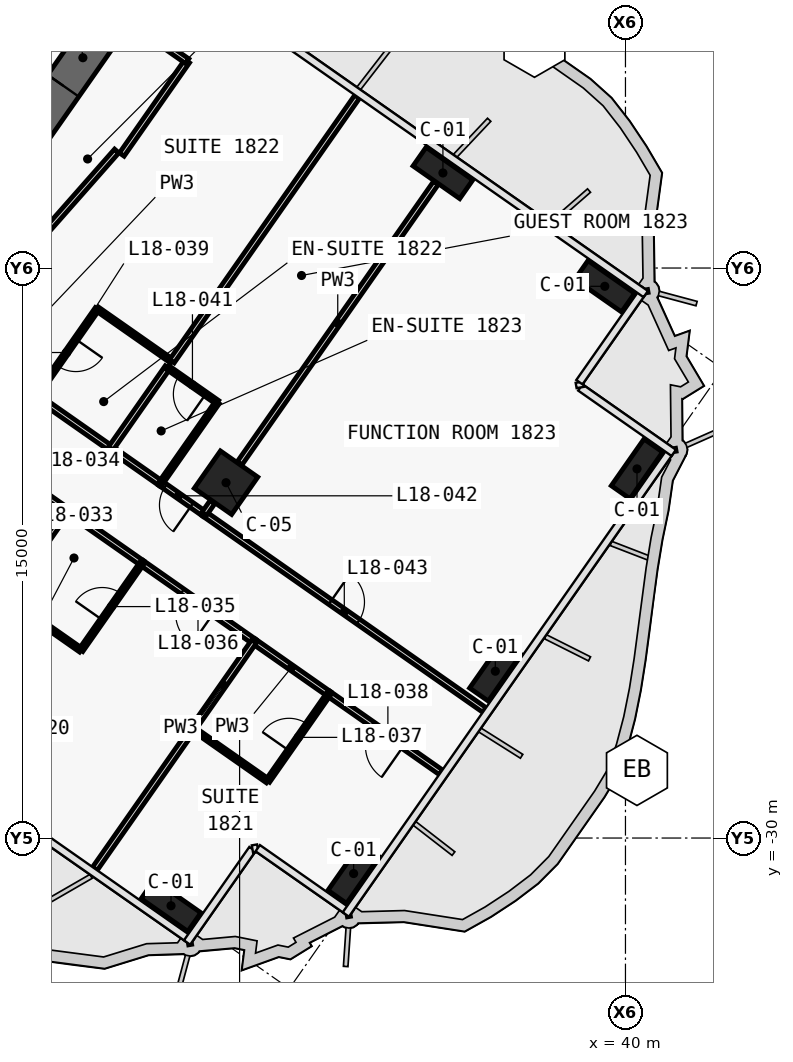
"""IFC4 building model, lengths in metres.
Left out: names, types, materials, properties, quantities, classifications, styles, units other than length and angle.
Written with IfcOpenShell. Run it as: python <this file> out.ifc"""

import sys

from ifc_helpers import new_model, si_unit, direction, frame, frame_2d, origin, origin_2d, place, context, subcontext, project, spatial, polyline, rectangle, outline, extrude, element, fill, save


model = new_model("IFC4")
c1 = context("Model", 3, precision=1e-05, world=origin(), true_north=direction((0.0, 1.0)))
c2 = subcontext(c1, "Body", "Model", "MODEL_VIEW")
j1 = project(units=[si_unit("LENGTHUNIT", "METRE"), si_unit("PLANEANGLEUNIT", "RADIAN")], contexts=[c1])
p1 = place(None, origin())
s1 = spatial("IfcSite", under=j1, at=p1, CompositionType="ELEMENT")
p2 = place(p1, origin())
s2 = spatial("IfcBuilding", under=s1, at=p2, CompositionType="ELEMENT")
p3 = place(p2, frame((0.0, 0.0, 90.5)))
s3 = spatial("IfcBuildingStorey", under=s2, at=p3, CompositionType="ELEMENT", Elevation=90.5)
p4 = place(p3, frame((21.708, -15.2, 0.0), z_axis=(0.0, 0.0, 1.0), x_axis=(0.573576324356, 0.819152122709, 0.0)))
e1 = element("IfcWall", 1, at=p4, inside=s3, PredefinedType="SHEAR", context=c2, shape_type="SweptSolid", body=[
    extrude(outline(polyline([(9.2, 0.5), (0.0, 0.5), (0.0, -0.5), (9.2, -0.5), (9.2, 0.5)])), origin(), (0.0, 0.0, 1.0), 3.6),
])
p5 = place(p4, frame((6.1, 0.0, 0.0)))
e2 = element("IfcOpeningElement", 2, at=p5, cuts=e1, PredefinedType="OPENING", context=c2, shape_type="SweptSolid", body=[
    extrude(rectangle(XDim=1.8, YDim=2.1, at=frame_2d((0.9, 1.05))), frame((0.0, 0.51, 0.0), z_axis=(0.0, -1.0, 0.0), x_axis=(1.0, 0.0, 0.0)), (0.0, 0.0, 1.0), 1.02),
])
p6 = place(p4, frame((1.9, 0.0, 0.0)))
e3 = element("IfcOpeningElement", 3, at=p6, cuts=e1, PredefinedType="OPENING", context=c2, shape_type="SweptSolid", body=[
    extrude(rectangle(XDim=1.8, YDim=2.1, at=frame_2d((0.9, 1.05))), frame((0.0, 0.51, 0.0), z_axis=(0.0, -1.0, 0.0), x_axis=(1.0, 0.0, 0.0)), (0.0, 0.0, 1.0), 1.02),
])
for number, where, z_axis, x_axis in (
    (4, (28.042, -31.782, 0.0), (0.0, 0.0, 1.0), (0.819, -0.574, 0.0)),
    (5, (35.197, -12.498, 0.0), (0.0, 0.0, 1.0), (0.819, -0.574, 0.0)),
    (6, (39.456, -15.481, 0.0), (0.0, 0.0, 1.0), (0.819, -0.574, 0.0)),
    (7, (32.847, -30.935, 0.0), (0.0, 0.0, 1.0), (0.574, 0.819, 0.0)),
    (8, (36.575, -25.61, 0.0), (0.0, 0.0, 1.0), (0.574, 0.819, 0.0)),
    (9, (40.303, -20.286, 0.0), (0.0, 0.0, 1.0), (0.574, 0.819, 0.0)),
):
    element("IfcColumn", number, at=place(p3, frame(where, z_axis=z_axis, x_axis=x_axis)), inside=s3, PredefinedType="COLUMN", context=c2, shape_type="SweptSolid", body=[
        extrude(rectangle(XDim=1.5, YDim=0.6, at=origin_2d()), origin(), (0.0, 0.0, 1.0), 3.6),
    ])
p7 = place(p3, frame((29.49, -20.649, 0.0), z_axis=(0.0, 0.0, 1.0), x_axis=(0.819152044289, -0.573576436351, 0.0)))
e10 = element("IfcColumn", 10, at=p7, inside=s3, PredefinedType="COLUMN", context=c2, shape_type="SweptSolid", body=[
    extrude(rectangle(XDim=1.2, YDim=1.2, at=origin_2d()), origin(), (0.0, 0.0, 1.0), 3.6),
])
p8 = place(p3, frame((24.491, -18.369, 0.0), z_axis=(0.0, 0.0, 1.0), x_axis=(0.819179439794, -0.573537309527, 0.0)))
e11 = element("IfcWall", 11, at=p8, inside=s3, PredefinedType="PARTITIONING", context=c2, shape_type="SweptSolid", body=[
    extrude(rectangle(XDim=2.404, YDim=0.15, at=frame_2d((1.202, 0.0))), origin(), (0.0, 0.0, 1.0), 3.32),
])
p9 = place(p3, frame((28.917, -21.469, 0.0), z_axis=(0.0, 0.0, 1.0), x_axis=(-0.81914197737, 0.573590813132, 0.0)))
e12 = element("IfcWall", 12, at=p9, inside=s3, PredefinedType="PARTITIONING", context=c2, shape_type="SweptSolid", body=[
    extrude(rectangle(XDim=1.403, YDim=0.15, at=frame_2d((0.701, 0.0))), origin(), (0.0, 0.0, 1.0), 2.6),
])
p10 = place(p9, frame((0.403, 0.0, 0.0)))
e13 = element("IfcOpeningElement", 13, at=p10, cuts=e12, PredefinedType="OPENING", context=c2, shape_type="SweptSolid", body=[
    extrude(rectangle(XDim=0.85, YDim=2.1, at=frame_2d((0.425, 1.05))), frame((0.0, 0.085, 0.0), z_axis=(0.0, -1.0, 0.0), x_axis=(1.0, 0.0, 0.0)), (0.0, 0.0, 1.0), 0.17),
])
p11 = place(p3, frame((26.457, -19.746, 0.0), z_axis=(0.0, 0.0, 1.0), x_axis=(0.819189013667, -0.573523634986, 0.0)))
e14 = element("IfcWall", 14, at=p11, inside=s3, PredefinedType="PARTITIONING", context=c2, shape_type="SweptSolid", body=[
    extrude(rectangle(XDim=1.604, YDim=0.15, at=frame_2d((0.802, 0.0))), origin(), (0.0, 0.0, 1.0), 3.32),
])
p12 = place(p3, frame((28.914, -21.467, 0.0), z_axis=(0.0, 0.0, 1.0), x_axis=(0.81915291695, -0.57357519006, 0.0)))
e15 = element("IfcWall", 15, at=p12, inside=s3, PredefinedType="PARTITIONING", context=c2, shape_type="SweptSolid", body=[
    extrude(rectangle(XDim=9.002, YDim=0.15, at=frame_2d((4.501, 0.0))), origin(), (0.0, 0.0, 1.0), 2.5),
])
p13 = place(p12, frame((4.051, 0.0, 0.0)))
e16 = element("IfcOpeningElement", 16, at=p13, cuts=e15, PredefinedType="OPENING", context=c2, shape_type="SweptSolid", body=[
    extrude(rectangle(XDim=0.9, YDim=2.1, at=frame_2d((0.45, 1.05))), frame((0.0, 0.085, 0.0), z_axis=(0.0, -1.0, 0.0), x_axis=(1.0, 0.0, 0.0)), (0.0, 0.0, 1.0), 0.17),
])
p14 = place(p3, frame((25.313, -21.387, 0.0), z_axis=(0.0, 0.0, 1.0), x_axis=(-0.819117502046, 0.573625764625, 0.0)))
e17 = element("IfcWall", 17, at=p14, inside=s3, PredefinedType="PARTITIONING", context=c2, shape_type="SweptSolid", body=[
    extrude(rectangle(XDim=1.604, YDim=0.15, at=frame_2d((0.802, 0.0))), origin(), (0.0, 0.0, 1.0), 3.32),
])
p15 = place(p3, frame((30.228, -24.828, 0.0), z_axis=(0.0, 0.0, 1.0), x_axis=(-0.819145961204, 0.573585123798, 0.0)))
e18 = element("IfcWall", 18, at=p15, inside=s3, PredefinedType="PARTITIONING", context=c2, shape_type="SweptSolid", body=[
    extrude(rectangle(XDim=3.603, YDim=0.15, at=frame_2d((1.802, 0.0))), origin(), (0.0, 0.0, 1.0), 2.6),
])
p16 = place(p15, frame((1.302, 0.0, 0.0)))
e19 = element("IfcOpeningElement", 19, at=p16, cuts=e18, PredefinedType="OPENING", context=c2, shape_type="SweptSolid", body=[
    extrude(rectangle(XDim=1.0, YDim=2.1, at=frame_2d((0.5, 1.05))), frame((0.0, 0.085, 0.0), z_axis=(0.0, -1.0, 0.0), x_axis=(1.0, 0.0, 0.0)), (0.0, 0.0, 1.0), 0.17),
])
p17 = place(p3, frame((27.279, -22.763, 0.0), z_axis=(0.0, 0.0, 1.0), x_axis=(-0.819146032251, 0.573585022335, 0.0)))
e20 = element("IfcWall", 20, at=p17, inside=s3, PredefinedType="PARTITIONING", context=c2, shape_type="SweptSolid", body=[
    extrude(rectangle(XDim=2.404, YDim=0.15, at=frame_2d((1.202, 0.0))), origin(), (0.0, 0.0, 1.0), 3.32),
])
p18 = place(p3, frame((35.141, -28.268, 0.0), z_axis=(0.0, 0.0, 1.0), x_axis=(-0.819149096931, 0.573580645591, 0.0)))
e21 = element("IfcWall", 21, at=p18, inside=s3, PredefinedType="PARTITIONING", context=c2, shape_type="SweptSolid", body=[
    extrude(rectangle(XDim=3.601, YDim=0.15, at=frame_2d((1.8, 0.0))), origin(), (0.0, 0.0, 1.0), 2.5),
])
p19 = place(p18, frame((1.2, 0.0, 0.0)))
e22 = element("IfcOpeningElement", 22, at=p19, cuts=e21, PredefinedType="OPENING", context=c2, shape_type="SweptSolid", body=[
    extrude(rectangle(XDim=1.0, YDim=2.1, at=frame_2d((0.5, 1.05))), frame((0.0, 0.085, 0.0), z_axis=(0.0, -1.0, 0.0), x_axis=(1.0, 0.0, 0.0)), (0.0, 0.0, 1.0), 0.17),
])
p20 = place(p3, frame((32.194, -26.205, 0.0), z_axis=(0.0, 0.0, 1.0), x_axis=(-0.819146032251, 0.573585022335, 0.0)))
e23 = element("IfcWall", 23, at=p20, inside=s3, PredefinedType="PARTITIONING", context=c2, shape_type="SweptSolid", body=[
    extrude(rectangle(XDim=2.404, YDim=0.15, at=frame_2d((1.202, 0.0))), origin(), (0.0, 0.0, 1.0), 3.32),
])
p21 = place(p3, frame((26.098, -16.076, 0.0), z_axis=(0.0, 0.0, 1.0), x_axis=(-0.573550118428, -0.819170471667, 0.0)))
e24 = element("IfcWall", 24, at=p21, inside=s3, PredefinedType="PARTITIONING", context=c2, shape_type="SweptSolid", body=[
    extrude(rectangle(XDim=2.8, YDim=0.12, at=frame_2d((1.4, 0.0))), origin(), (0.0, 0.0, 1.0), 2.6),
])
p22 = place(p21, frame((0.975, 0.0, 0.0)))
e25 = element("IfcOpeningElement", 25, at=p22, cuts=e24, PredefinedType="OPENING", context=c2, shape_type="SweptSolid", body=[
    extrude(rectangle(XDim=0.85, YDim=2.05, at=frame_2d((0.425, 1.025))), frame((0.0, 0.07, 0.0), z_axis=(0.0, -1.0, 0.0), x_axis=(1.0, 0.0, 0.0)), (0.0, 0.0, 1.0), 0.14),
])
p23 = place(p3, frame((28.065, -17.453, 0.0), z_axis=(0.0, 0.0, 1.0), x_axis=(-0.819155442668, 0.573571582932, 0.0)))
e26 = element("IfcWall", 26, at=p23, inside=s3, PredefinedType="PARTITIONING", context=c2, shape_type="SweptSolid", body=[
    extrude(rectangle(XDim=2.4, YDim=0.12, at=frame_2d((1.2, 0.0))), origin(), (0.0, 0.0, 1.0), 3.32),
])
p24 = place(p3, frame((32.94, -10.491, 0.0), z_axis=(0.0, 0.0, 1.0), x_axis=(-0.573593433868, -0.819140142237, 0.0)))
e27 = element("IfcWall", 27, at=p24, inside=s3, PredefinedType="PARTITIONING", context=c2, shape_type="SweptSolid", body=[
    extrude(rectangle(XDim=8.499, YDim=0.15, at=frame_2d((4.25, 0.0))), origin(), (0.0, 0.0, 1.0), 2.6),
])
p25 = place(p3, frame((22.285, -16.825, 0.0), z_axis=(0.0, 0.0, 1.0), x_axis=(0.661551268245, 0.749899939647, 0.0)))
e28 = element("IfcWall", 28, at=p25, inside=s3, PredefinedType="PARTITIONING", context=c2, shape_type="SweptSolid", body=[
    extrude(rectangle(XDim=6.541, YDim=0.15, at=frame_2d((3.271, 0.0))), origin(), (0.0, 0.0, 1.0), 2.6),
])
p26 = place(p3, frame((26.746, -12.014, 0.0), z_axis=(0.0, 0.0, 1.0), x_axis=(0.573560650686, 0.819163097304, 0.0)))
e29 = element("IfcWall", 29, at=p26, inside=s3, PredefinedType="PARTITIONING", context=c2, shape_type="SweptSolid", body=[
    extrude(rectangle(XDim=3.0, YDim=0.15, at=frame_2d((1.5, 0.0))), origin(), (0.0, 0.0, 1.0), 3.32),
])
p27 = place(p3, frame((28.467, -9.556, 0.0), z_axis=(0.0, 0.0, 1.0), x_axis=(-0.819109000826, 0.573637903879, 0.0)))
e30 = element("IfcWall", 30, at=p27, inside=s3, PredefinedType="PARTITIONING", context=c2, shape_type="SweptSolid", body=[
    extrude(rectangle(XDim=1.68, YDim=0.15, at=frame_2d((0.84, 0.0))), origin(), (0.0, 0.0, 1.0), 3.32),
])
p28 = place(p3, frame((27.951, -17.616, 0.0), z_axis=(0.0, 0.0, 1.0), x_axis=(-0.573544201094, -0.819174614714, 0.0)))
e31 = element("IfcWall", 31, at=p28, inside=s3, PredefinedType="PARTITIONING", context=c2, shape_type="SweptSolid", body=[
    extrude(rectangle(XDim=2.602, YDim=0.15, at=frame_2d((1.301, 0.0))), origin(), (0.0, 0.0, 1.0), 2.6),
])
p29 = place(p3, frame((27.77, -20.666, 0.0), z_axis=(0.0, 0.0, 1.0), x_axis=(0.573537965655, 0.819178980414, 0.0)))
e32 = element("IfcWall", 32, at=p29, inside=s3, PredefinedType="PARTITIONING", context=c2, shape_type="SweptSolid", body=[
    extrude(rectangle(XDim=2.6, YDim=0.12, at=frame_2d((1.3, 0.0))), origin(), (0.0, 0.0, 1.0), 2.6),
])
p30 = place(p3, frame((29.261, -18.534, 0.0), z_axis=(0.0, 0.0, 1.0), x_axis=(-0.819253425856, 0.573431621227, 0.0)))
e33 = element("IfcWall", 33, at=p30, inside=s3, PredefinedType="PARTITIONING", context=c2, shape_type="SweptSolid", body=[
    extrude(rectangle(XDim=1.6, YDim=0.12, at=frame_2d((0.8, 0.0))), origin(), (0.0, 0.0, 1.0), 3.32),
])
p31 = place(p30, frame((0.375, 0.0, 0.0)))
e34 = element("IfcOpeningElement", 34, at=p31, cuts=e33, PredefinedType="OPENING", context=c2, shape_type="SweptSolid", body=[
    extrude(rectangle(XDim=0.85, YDim=2.05, at=frame_2d((0.425, 1.025))), frame((0.0, 0.07, 0.0), z_axis=(0.0, -1.0, 0.0), x_axis=(1.0, 0.0, 0.0)), (0.0, 0.0, 1.0), 0.14),
])
p32 = place(p3, frame((35.013, -12.76, 0.0), z_axis=(0.0, 0.0, 1.0), x_axis=(-0.573558725113, -0.819164445546, 0.0)))
e35 = element("IfcWall", 35, at=p32, inside=s3, PredefinedType="PARTITIONING", context=c2, shape_type="SweptSolid", body=[
    extrude(rectangle(XDim=9.01, YDim=0.15, at=frame_2d((4.505, 0.0))), origin(), (0.0, 0.0, 1.0), 2.6),
])
p33 = place(p3, frame((29.134, -21.156, 0.0), z_axis=(0.0, 0.0, 1.0), x_axis=(-0.572944929411, -0.819593867633, 0.0)))
e36 = element("IfcWall", 36, at=p33, inside=s3, PredefinedType="PARTITIONING", context=c2, shape_type="SweptSolid", body=[
    extrude(rectangle(XDim=0.38, YDim=0.15, at=frame_2d((0.19, 0.0))), origin(), (0.0, 0.0, 1.0), 2.6),
])
p34 = place(p3, frame((25.311, -21.385, 0.0), z_axis=(0.0, 0.0, 1.0), x_axis=(-0.573537965655, -0.819178980414, 0.0)))
e37 = element("IfcWall", 37, at=p34, inside=s3, PredefinedType="PARTITIONING", context=c2, shape_type="SweptSolid", body=[
    extrude(rectangle(XDim=2.6, YDim=0.15, at=frame_2d((1.3, 0.0))), origin(), (0.0, 0.0, 1.0), 3.32),
])
p35 = place(p3, frame((23.705, -23.68, 0.0), z_axis=(0.0, 0.0, 1.0), x_axis=(0.819188907105, -0.573523787192, 0.0)))
e38 = element("IfcWall", 38, at=p35, inside=s3, PredefinedType="PARTITIONING", context=c2, shape_type="SweptSolid", body=[
    extrude(rectangle(XDim=2.4, YDim=0.12, at=frame_2d((1.2, 0.0))), origin(), (0.0, 0.0, 1.0), 3.32),
])
p36 = place(p3, frame((25.672, -25.056, 0.0), z_axis=(0.0, 0.0, 1.0), x_axis=(0.573550118428, 0.819170471667, 0.0)))
e39 = element("IfcWall", 39, at=p36, inside=s3, PredefinedType="PARTITIONING", context=c2, shape_type="SweptSolid", body=[
    extrude(rectangle(XDim=2.8, YDim=0.12, at=frame_2d((1.4, 0.0))), origin(), (0.0, 0.0, 1.0), 3.32),
])
p37 = place(p36, frame((0.975, 0.0, 0.0)))
e40 = element("IfcOpeningElement", 40, at=p37, cuts=e39, PredefinedType="OPENING", context=c2, shape_type="SweptSolid", body=[
    extrude(rectangle(XDim=0.85, YDim=2.05, at=frame_2d((0.425, 1.025))), frame((0.0, 0.07, 0.0), z_axis=(0.0, -1.0, 0.0), x_axis=(1.0, 0.0, 0.0)), (0.0, 0.0, 1.0), 0.14),
])
p38 = place(p3, frame((28.621, -27.12, 0.0), z_axis=(0.0, 0.0, 1.0), x_axis=(-0.573593387921, -0.81914017441, 0.0)))
e41 = element("IfcWall", 41, at=p38, inside=s3, PredefinedType="PARTITIONING", context=c2, shape_type="SweptSolid", body=[
    extrude(rectangle(XDim=4.501, YDim=0.15, at=frame_2d((2.25, 0.0))), origin(), (0.0, 0.0, 1.0), 2.5),
])
p39 = place(p3, frame((30.226, -24.827, 0.0), z_axis=(0.0, 0.0, 1.0), x_axis=(-0.573614360281, -0.819125488359, 0.0)))
e42 = element("IfcWall", 42, at=p39, inside=s3, PredefinedType="PARTITIONING", context=c2, shape_type="SweptSolid", body=[
    extrude(rectangle(XDim=2.802, YDim=0.15, at=frame_2d((1.401, 0.0))), origin(), (0.0, 0.0, 1.0), 3.32),
])
p40 = place(p3, frame((28.62, -27.121, 0.0), z_axis=(0.0, 0.0, 1.0), x_axis=(0.819141114317, -0.573592045652, 0.0)))
e43 = element("IfcWall", 43, at=p40, inside=s3, PredefinedType="PARTITIONING", context=c2, shape_type="SweptSolid", body=[
    extrude(rectangle(XDim=2.4, YDim=0.12, at=frame_2d((1.2, 0.0))), origin(), (0.0, 0.0, 1.0), 3.32),
])
p41 = place(p3, frame((30.587, -28.498, 0.0), z_axis=(0.0, 0.0, 1.0), x_axis=(0.573608623498, 0.819129505664, 0.0)))
e44 = element("IfcWall", 44, at=p41, inside=s3, PredefinedType="PARTITIONING", context=c2, shape_type="SweptSolid", body=[
    extrude(rectangle(XDim=2.8, YDim=0.12, at=frame_2d((1.4, 0.0))), origin(), (0.0, 0.0, 1.0), 3.32),
])
p42 = place(p41, frame((0.975, 0.0, 0.0)))
e45 = element("IfcOpeningElement", 45, at=p42, cuts=e44, PredefinedType="OPENING", context=c2, shape_type="SweptSolid", body=[
    extrude(rectangle(XDim=0.85, YDim=2.05, at=frame_2d((0.425, 1.025))), frame((0.0, 0.07, 0.0), z_axis=(0.0, -1.0, 0.0), x_axis=(1.0, 0.0, 0.0)), (0.0, 0.0, 1.0), 0.14),
])
p43 = place(p5, origin())
e46 = element("IfcDoor", 46, at=p43, inside=s3, OperationType="DOUBLE_DOOR_SINGLE_SWING", PredefinedType="DOOR", context=c2, shape_type="SweptSolid", body=[
    extrude(rectangle(XDim=1.8, YDim=2.1, at=frame_2d((0.9, 1.05))), frame((0.0, 0.025, 0.0), z_axis=(0.0, -1.0, 0.0), x_axis=(1.0, 0.0, 0.0)), (0.0, 0.0, 1.0), 0.05),
])
fill(e2, e46)
p44 = place(p37, origin())
e47 = element("IfcDoor", 47, at=p44, inside=s3, OperationType="SINGLE_SWING_LEFT", PredefinedType="DOOR", context=c2, shape_type="SweptSolid", body=[
    extrude(rectangle(XDim=0.85, YDim=2.05, at=frame_2d((0.425, 1.025))), frame((0.0, 0.025, 0.0), z_axis=(0.0, -1.0, 0.0), x_axis=(1.0, 0.0, 0.0)), (0.0, 0.0, 1.0), 0.05),
])
fill(e40, e47)
p45 = place(p16, origin())
e48 = element("IfcDoor", 48, at=p45, inside=s3, OperationType="SINGLE_SWING_RIGHT", PredefinedType="DOOR", context=c2, shape_type="SweptSolid", body=[
    extrude(rectangle(XDim=1.0, YDim=2.1, at=frame_2d((0.5, 1.05))), frame((0.0, 0.025, 0.0), z_axis=(0.0, -1.0, 0.0), x_axis=(1.0, 0.0, 0.0)), (0.0, 0.0, 1.0), 0.05),
])
fill(e19, e48)
p46 = place(p42, origin())
e49 = element("IfcDoor", 49, at=p46, inside=s3, OperationType="SINGLE_SWING_LEFT", PredefinedType="DOOR", context=c2, shape_type="SweptSolid", body=[
    extrude(rectangle(XDim=0.85, YDim=2.05, at=frame_2d((0.425, 1.025))), frame((0.0, 0.025, 0.0), z_axis=(0.0, -1.0, 0.0), x_axis=(1.0, 0.0, 0.0)), (0.0, 0.0, 1.0), 0.05),
])
fill(e45, e49)
p47 = place(p19, origin())
e50 = element("IfcDoor", 50, at=p47, inside=s3, OperationType="SINGLE_SWING_LEFT", PredefinedType="DOOR", context=c2, shape_type="SweptSolid", body=[
    extrude(rectangle(XDim=1.0, YDim=2.1, at=frame_2d((0.5, 1.05))), frame((0.0, 0.025, 0.0), z_axis=(0.0, -1.0, 0.0), x_axis=(1.0, 0.0, 0.0)), (0.0, 0.0, 1.0), 0.05),
])
fill(e22, e50)
p48 = place(p22, origin())
e51 = element("IfcDoor", 51, at=p48, inside=s3, OperationType="SINGLE_SWING_LEFT", PredefinedType="DOOR", context=c2, shape_type="SweptSolid", body=[
    extrude(rectangle(XDim=0.85, YDim=2.05, at=frame_2d((0.425, 1.025))), frame((0.0, 0.025, 0.0), z_axis=(0.0, -1.0, 0.0), x_axis=(1.0, 0.0, 0.0)), (0.0, 0.0, 1.0), 0.05),
])
fill(e25, e51)
p49 = place(p31, origin())
e52 = element("IfcDoor", 52, at=p49, inside=s3, OperationType="SINGLE_SWING_LEFT", PredefinedType="DOOR", context=c2, shape_type="SweptSolid", body=[
    extrude(rectangle(XDim=0.85, YDim=2.05, at=frame_2d((0.425, 1.025))), frame((0.0, 0.025, 0.0), z_axis=(0.0, -1.0, 0.0), x_axis=(1.0, 0.0, 0.0)), (0.0, 0.0, 1.0), 0.05),
])
fill(e34, e52)
p50 = place(p10, origin())
e53 = element("IfcDoor", 53, at=p50, inside=s3, OperationType="SINGLE_SWING_RIGHT", PredefinedType="DOOR", context=c2, shape_type="SweptSolid", body=[
    extrude(rectangle(XDim=0.85, YDim=2.1, at=frame_2d((0.425, 1.05))), frame((0.0, 0.025, 0.0), z_axis=(0.0, -1.0, 0.0), x_axis=(1.0, 0.0, 0.0)), (0.0, 0.0, 1.0), 0.05),
])
fill(e13, e53)
p51 = place(p13, origin())
e54 = element("IfcDoor", 54, at=p51, inside=s3, OperationType="SINGLE_SWING_RIGHT", PredefinedType="DOOR", context=c2, shape_type="SweptSolid", body=[
    extrude(rectangle(XDim=0.9, YDim=2.1, at=frame_2d((0.45, 1.05))), frame((0.0, 0.025, 0.0), z_axis=(0.0, -1.0, 0.0), x_axis=(1.0, 0.0, 0.0)), (0.0, 0.0, 1.0), 0.05),
])
fill(e16, e54)
save(model, sys.argv[1])
